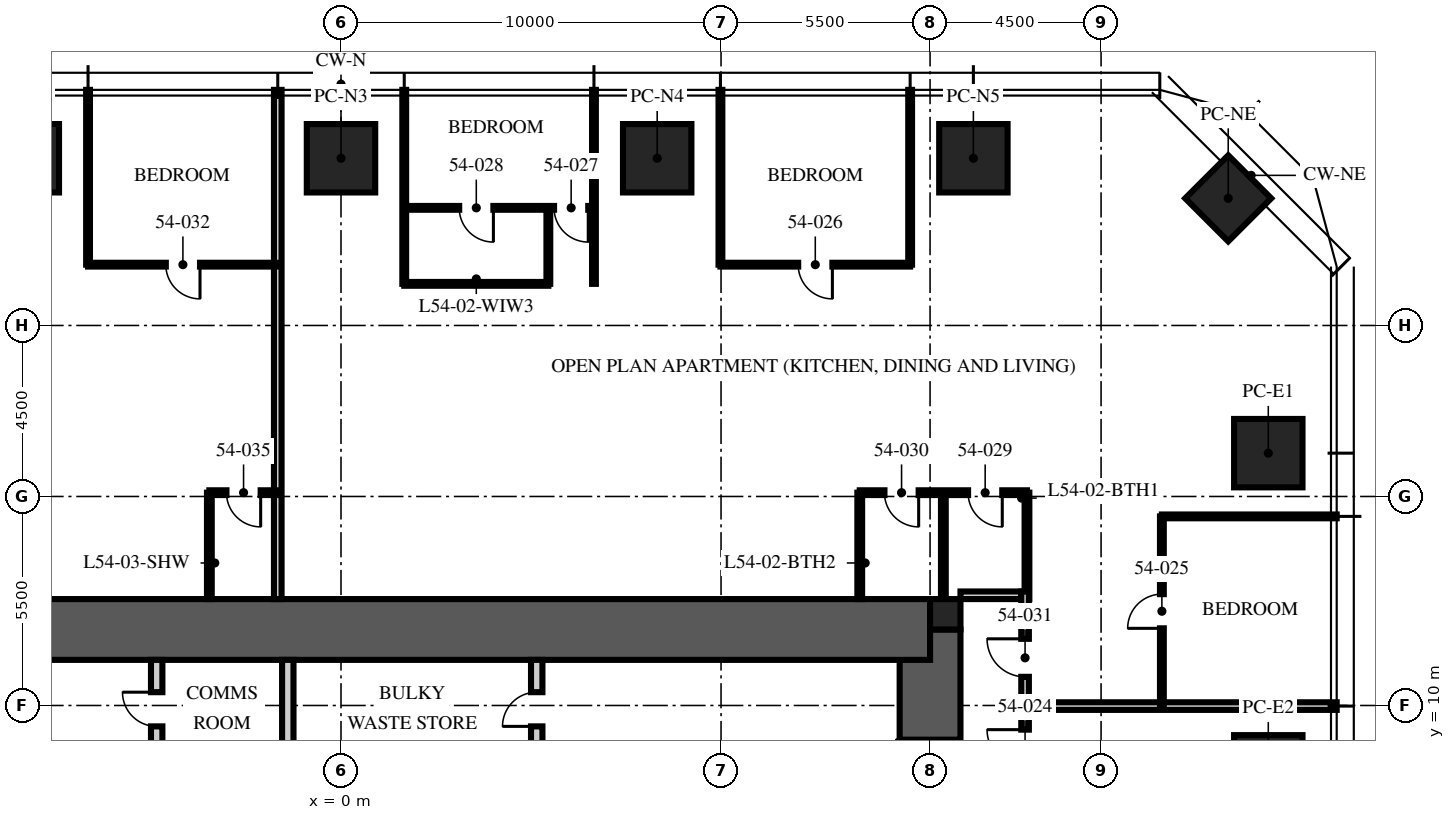
"""IFC4 building model, lengths in metres.
Left out: names, types, materials, properties, quantities, classifications, styles, units other than length and angle.
Written with IfcOpenShell. Run it as: python <this file> out.ifc"""

import sys

from ifc_helpers import new_model, si_unit, direction, frame, frame_2d, origin, origin_2d, place, context, subcontext, project, spatial, rectangle, extrude, element, fill, save


model = new_model("IFC4")
c1 = context("Model", 3, precision=1e-05, world=origin(), true_north=direction((0.0, 1.0)))
c2 = subcontext(c1, "Body", "Model", "MODEL_VIEW")
j1 = project(units=[si_unit("LENGTHUNIT", "METRE"), si_unit("PLANEANGLEUNIT", "RADIAN")], contexts=[c1])
p1 = place(None, origin())
s1 = spatial("IfcSite", under=j1, at=p1, CompositionType="ELEMENT")
p2 = place(p1, origin())
s2 = spatial("IfcBuilding", under=s1, at=p2, CompositionType="ELEMENT")
p3 = place(p2, frame((0.0, 0.0, 218.25)))
s3 = spatial("IfcBuildingStorey", under=s2, at=p3, CompositionType="ELEMENT", Elevation=218.25)
p4 = place(p3, frame((15.5, -12.0, -0.25), z_axis=(0.0, 0.0, 1.0), x_axis=(0.0, 1.0, 0.0)))
e1 = element("IfcWall", 1, at=p4, inside=s3, PredefinedType="SHEAR", context=c2, shape_type="SweptSolid", body=[
    extrude(rectangle(XDim=24.0, YDim=1.6, at=frame_2d((12.0, 0.0))), origin(), (0.0, 0.0, 1.0), 3.75),
])
p5 = place(p4, frame((3.2, 0.0, 0.25)))
e2 = element("IfcOpeningElement", 2, at=p5, cuts=e1, PredefinedType="OPENING", context=c2, shape_type="SweptSolid", body=[
    extrude(rectangle(XDim=1.2, YDim=2.1, at=frame_2d((0.6, 1.05))), frame((0.0, 0.81, 0.0), z_axis=(0.0, -1.0, 0.0), x_axis=(1.0, 0.0, 0.0)), (0.0, 0.0, 1.0), 1.62),
])
p6 = place(p4, frame((19.3, 0.0, 0.25)))
e3 = element("IfcOpeningElement", 3, at=p6, cuts=e1, PredefinedType="OPENING", context=c2, shape_type="SweptSolid", body=[
    extrude(rectangle(XDim=1.8, YDim=2.1, at=frame_2d((0.9, 1.05))), frame((0.0, 0.81, 0.0), z_axis=(0.0, -1.0, 0.0), x_axis=(1.0, 0.0, 0.0)), (0.0, 0.0, 1.0), 1.62),
])
p7 = place(p3, frame((-15.5, 12.0, -0.25), z_axis=(0.0, 0.0, 1.0), x_axis=(1.0, 0.0, 0.0)))
e4 = element("IfcWall", 4, at=p7, inside=s3, PredefinedType="SHEAR", context=c2, shape_type="SweptSolid", body=[
    extrude(rectangle(XDim=31.0, YDim=1.6, at=frame_2d((15.5, 0.0))), origin(), (0.0, 0.0, 1.0), 3.75),
])
p8 = place(p3, frame((15.9, 12.4, -0.25), z_axis=(0.0, 0.0, 1.0), x_axis=(1.0, 0.0, 0.0)))
e5 = element("IfcColumn", 5, at=p8, inside=s3, PredefinedType="COLUMN", context=c2, shape_type="SweptSolid", body=[
    extrude(rectangle(XDim=0.8, YDim=0.8, at=origin_2d()), origin(), (0.0, 0.0, 1.0), 3.75),
])
for number, where, z_axis, x_axis in (
    (6, (-8.32, 24.4, 0.0), (0.0, 0.0, 1.0), (1.0, 0.0, 0.0)),
    (7, (0.0, 24.4, 0.0), (0.0, 0.0, 1.0), (1.0, 0.0, 0.0)),
    (8, (8.32, 24.4, 0.0), (0.0, 0.0, 1.0), (1.0, 0.0, 0.0)),
    (9, (16.64, 24.4, 0.0), (0.0, 0.0, 1.0), (1.0, 0.0, 0.0)),
    (10, (24.4, 16.64, 0.0), (0.0, 0.0, 1.0), (0.0, 1.0, 0.0)),
    (11, (24.4, 8.32, 0.0), (0.0, 0.0, 1.0), (0.0, 1.0, 0.0)),
):
    element("IfcColumn", number, at=place(p3, frame(where, z_axis=z_axis, x_axis=x_axis)), inside=s3, PredefinedType="COLUMN", context=c2, shape_type="SweptSolid", body=[
        extrude(rectangle(XDim=1.8, YDim=1.8, at=origin_2d()), origin(), (0.0, 0.0, 1.0), 3.75),
    ])
p9 = place(p3, frame((23.346, 23.346, 0.0), z_axis=(0.0, 0.0, 1.0), x_axis=(0.707106781187, -0.707106781187, 0.0)))
e12 = element("IfcColumn", 12, at=p9, inside=s3, PredefinedType="COLUMN", context=c2, shape_type="SweptSolid", body=[
    extrude(rectangle(XDim=1.6, YDim=1.6, at=origin_2d()), origin(), (0.0, 0.0, 1.0), 3.75),
])
p10 = place(p3, frame((-4.85, 5.3, 0.0), z_axis=(0.0, 0.0, 1.0), x_axis=(0.0, 1.0, 0.0)))
e13 = element("IfcWall", 13, at=p10, inside=s3, PredefinedType="PARTITIONING", context=c2, shape_type="SweptSolid", body=[
    extrude(rectangle(XDim=5.9, YDim=0.3, at=frame_2d((2.95, 0.0))), origin(), (0.0, 0.0, 1.0), 3.5),
])
p11 = place(p10, frame((4.15, 0.0, 0.0)))
e14 = element("IfcOpeningElement", 14, at=p11, cuts=e13, PredefinedType="OPENING", context=c2, shape_type="SweptSolid", body=[
    extrude(rectangle(XDim=0.9, YDim=2.1, at=frame_2d((0.45, 1.05))), frame((0.0, 0.16, 0.0), z_axis=(0.0, -1.0, 0.0), x_axis=(1.0, 0.0, 0.0)), (0.0, 0.0, 1.0), 0.32),
])
p12 = place(p3, frame((5.15, 5.3, 0.0), z_axis=(0.0, 0.0, 1.0), x_axis=(0.0, 1.0, 0.0)))
e15 = element("IfcWall", 15, at=p12, inside=s3, PredefinedType="PARTITIONING", context=c2, shape_type="SweptSolid", body=[
    extrude(rectangle(XDim=5.9, YDim=0.3, at=frame_2d((2.95, 0.0))), origin(), (0.0, 0.0, 1.0), 3.5),
])
p13 = place(p12, frame((4.15, 0.0, 0.0)))
e16 = element("IfcOpeningElement", 16, at=p13, cuts=e15, PredefinedType="OPENING", context=c2, shape_type="SweptSolid", body=[
    extrude(rectangle(XDim=0.9, YDim=2.1, at=frame_2d((0.45, 1.05))), frame((0.0, 0.16, 0.0), z_axis=(0.0, -1.0, 0.0), x_axis=(1.0, 0.0, 0.0)), (0.0, 0.0, 1.0), 0.32),
])
p14 = place(p3, frame((-1.4, 8.5, 0.0), z_axis=(0.0, 0.0, 1.0), x_axis=(0.0, 1.0, 0.0)))
e17 = element("IfcWall", 17, at=p14, inside=s3, PredefinedType="PARTITIONING", context=c2, shape_type="SweptSolid", body=[
    extrude(rectangle(XDim=2.7, YDim=0.3, at=frame_2d((1.35, 0.0))), origin(), (0.0, 0.0, 1.0), 3.5),
])
p15 = place(p3, frame((16.3, 12.9, 0.0), z_axis=(0.0, 0.0, 1.0), x_axis=(1.0, 0.0, 0.0)))
e18 = element("IfcWall", 18, at=p15, inside=s3, PredefinedType="PARTITIONING", context=c2, shape_type="SweptSolid", body=[
    extrude(rectangle(XDim=1.6, YDim=0.2, at=frame_2d((0.8, 0.0))), origin(), (0.0, 0.0, 1.0), 2.3),
])
p16 = place(p3, frame((18.1, 9.984, 0.0), z_axis=(0.0, 0.0, 1.0), x_axis=(1.0, 0.0, 0.0)))
e19 = element("IfcWall", 19, at=p16, inside=s3, PredefinedType="PARTITIONING", context=c2, shape_type="SweptSolid", body=[
    extrude(rectangle(XDim=8.1, YDim=0.2, at=frame_2d((4.05, 0.0))), origin(), (0.0, 0.0, 1.0), 2.91),
])
for number, where, z_axis, x_axis in (
    (20, (21.6, 14.976, 0.0), (0.0, 0.0, 1.0), (1.0, 0.0, 0.0)),
    (21, (14.976, 21.6, 0.0), (0.0, 0.0, 1.0), (0.0, 1.0, 0.0)),
    (22, (9.984, 21.6, 0.0), (0.0, 0.0, 1.0), (0.0, 1.0, 0.0)),
):
    element("IfcWall", number, at=place(p3, frame(where, z_axis=z_axis, x_axis=x_axis)), inside=s3, PredefinedType="PARTITIONING", context=c2, shape_type="SweptSolid", body=[
        extrude(rectangle(XDim=4.6, YDim=0.1, at=frame_2d((2.3, 0.0))), origin(), (0.0, 0.0, 1.0), 2.91),
    ])
for number, where, z_axis, x_axis in (
    (23, (6.656, 21.095, 0.0), (0.0, 0.0, 1.0), (0.0, 1.0, 0.0)),
    (24, (1.664, 21.095, 0.0), (0.0, 0.0, 1.0), (0.0, 1.0, 0.0)),
):
    element("IfcWall", number, at=place(p3, frame(where, z_axis=z_axis, x_axis=x_axis)), inside=s3, PredefinedType="PARTITIONING", context=c2, shape_type="SweptSolid", body=[
        extrude(rectangle(XDim=5.105, YDim=0.1, at=frame_2d((2.552, 0.0))), origin(), (0.0, 0.0, 1.0), 2.91),
    ])
p17 = place(p3, frame((-1.664, 12.8, 0.0), z_axis=(0.0, 0.0, 1.0), x_axis=(0.0, 1.0, 0.0)))
e25 = element("IfcWall", 25, at=p17, inside=s3, PredefinedType="PARTITIONING", context=c2, shape_type="SweptSolid", body=[
    extrude(rectangle(XDim=13.4, YDim=0.2, at=frame_2d((6.7, 0.0))), origin(), (0.0, 0.0, 1.0), 2.91),
])
p18 = place(p3, frame((-6.656, 21.6, 0.0), z_axis=(0.0, 0.0, 1.0), x_axis=(0.0, 1.0, 0.0)))
e26 = element("IfcWall", 26, at=p18, inside=s3, PredefinedType="PARTITIONING", context=c2, shape_type="SweptSolid", body=[
    extrude(rectangle(XDim=4.6, YDim=0.1, at=frame_2d((2.3, 0.0))), origin(), (0.0, 0.0, 1.0), 2.91),
])
p19 = place(p3, frame((21.6, 9.984, 0.0), z_axis=(0.0, 0.0, 1.0), x_axis=(0.0, 1.0, 0.0)))
e27 = element("IfcWall", 27, at=p19, inside=s3, PredefinedType="PARTITIONING", context=c2, shape_type="SweptSolid", body=[
    extrude(rectangle(XDim=4.992, YDim=0.1, at=frame_2d((2.496, 0.0))), origin(), (0.0, 0.0, 1.0), 2.81),
])
p20 = place(p19, frame((2.046, 0.0, 0.0)))
e28 = element("IfcOpeningElement", 28, at=p20, cuts=e27, PredefinedType="OPENING", context=c2, shape_type="SweptSolid", body=[
    extrude(rectangle(XDim=0.9, YDim=2.1, at=frame_2d((0.45, 1.05))), frame((0.0, 0.06, 0.0), z_axis=(0.0, -1.0, 0.0), x_axis=(1.0, 0.0, 0.0)), (0.0, 0.0, 1.0), 0.12),
])
p21 = place(p3, frame((14.976, 21.6, 0.0), z_axis=(0.0, 0.0, 1.0), x_axis=(-1.0, 0.0, 0.0)))
e29 = element("IfcWall", 29, at=p21, inside=s3, PredefinedType="PARTITIONING", context=c2, shape_type="SweptSolid", body=[
    extrude(rectangle(XDim=4.992, YDim=0.1, at=frame_2d((2.496, 0.0))), origin(), (0.0, 0.0, 1.0), 2.81),
])
p22 = place(p21, frame((2.046, 0.0, 0.0)))
e30 = element("IfcOpeningElement", 30, at=p22, cuts=e29, PredefinedType="OPENING", context=c2, shape_type="SweptSolid", body=[
    extrude(rectangle(XDim=0.9, YDim=2.1, at=frame_2d((0.45, 1.05))), frame((0.0, 0.06, 0.0), z_axis=(0.0, -1.0, 0.0), x_axis=(1.0, 0.0, 0.0)), (0.0, 0.0, 1.0), 0.12),
])
p23 = place(p3, frame((6.656, 23.095, 0.0), z_axis=(0.0, 0.0, 1.0), x_axis=(-1.0, 0.0, 0.0)))
e31 = element("IfcWall", 31, at=p23, inside=s3, PredefinedType="PARTITIONING", context=c2, shape_type="SweptSolid", body=[
    extrude(rectangle(XDim=4.992, YDim=0.1, at=frame_2d((2.496, 0.0))), origin(), (0.0, 0.0, 1.0), 2.81),
])
p24 = place(p23, frame((0.15, 0.0, 0.0)))
e32 = element("IfcOpeningElement", 32, at=p24, cuts=e31, PredefinedType="OPENING", context=c2, shape_type="SweptSolid", body=[
    extrude(rectangle(XDim=0.9, YDim=2.1, at=frame_2d((0.45, 1.05))), frame((0.0, 0.06, 0.0), z_axis=(0.0, -1.0, 0.0), x_axis=(1.0, 0.0, 0.0)), (0.0, 0.0, 1.0), 0.12),
])
p25 = place(p23, frame((2.646, 0.0, 0.0)))
e33 = element("IfcOpeningElement", 33, at=p25, cuts=e31, PredefinedType="OPENING", context=c2, shape_type="SweptSolid", body=[
    extrude(rectangle(XDim=0.9, YDim=2.1, at=frame_2d((0.45, 1.05))), frame((0.0, 0.06, 0.0), z_axis=(0.0, -1.0, 0.0), x_axis=(1.0, 0.0, 0.0)), (0.0, 0.0, 1.0), 0.12),
])
p26 = place(p3, frame((5.456, 21.095, 0.0), z_axis=(0.0, 0.0, 1.0), x_axis=(0.0, 1.0, 0.0)))
e34 = element("IfcWall", 34, at=p26, inside=s3, PredefinedType="PARTITIONING", context=c2, shape_type="SweptSolid", body=[
    extrude(rectangle(XDim=2.0, YDim=0.1, at=frame_2d((1.0, 0.0))), origin(), (0.0, 0.0, 1.0), 3.5),
])
p27 = place(p3, frame((5.456, 21.095, 0.0), z_axis=(0.0, 0.0, 1.0), x_axis=(-1.0, 0.0, 0.0)))
e35 = element("IfcWall", 35, at=p27, inside=s3, PredefinedType="PARTITIONING", context=c2, shape_type="SweptSolid", body=[
    extrude(rectangle(XDim=3.792, YDim=0.1, at=frame_2d((1.896, 0.0))), origin(), (0.0, 0.0, 1.0), 2.81),
])
p28 = place(p3, frame((18.05, 15.6, 0.0), z_axis=(0.0, 0.0, 1.0), x_axis=(-1.0, 0.0, 0.0)))
e36 = element("IfcWall", 36, at=p28, inside=s3, PredefinedType="PARTITIONING", context=c2, shape_type="SweptSolid", body=[
    extrude(rectangle(XDim=4.4, YDim=0.125, at=frame_2d((2.2, 0.0))), origin(), (0.0, 0.0, 1.0), 2.3),
])
p29 = place(p28, frame((0.65, 0.0, 0.0)))
e37 = element("IfcOpeningElement", 37, at=p29, cuts=e36, PredefinedType="OPENING", context=c2, shape_type="SweptSolid", body=[
    extrude(rectangle(XDim=0.9, YDim=2.1, at=frame_2d((0.45, 1.05))), frame((0.0, 0.073, 0.0), z_axis=(0.0, -1.0, 0.0), x_axis=(1.0, 0.0, 0.0)), (0.0, 0.0, 1.0), 0.145),
])
p30 = place(p28, frame((2.85, 0.0, 0.0)))
e38 = element("IfcOpeningElement", 38, at=p30, cuts=e36, PredefinedType="OPENING", context=c2, shape_type="SweptSolid", body=[
    extrude(rectangle(XDim=0.9, YDim=2.1, at=frame_2d((0.45, 1.05))), frame((0.0, 0.073, 0.0), z_axis=(0.0, -1.0, 0.0), x_axis=(1.0, 0.0, 0.0)), (0.0, 0.0, 1.0), 0.145),
])
for number, where, z_axis, x_axis in (
    (39, (18.05, 12.8, 0.0), (0.0, 0.0, 1.0), (0.0, 1.0, 0.0)),
    (40, (15.85, 12.8, 0.0), (0.0, 0.0, 1.0), (0.0, 1.0, 0.0)),
):
    element("IfcWall", number, at=place(p3, frame(where, z_axis=z_axis, x_axis=x_axis)), inside=s3, PredefinedType="PARTITIONING", context=c2, shape_type="SweptSolid", body=[
        extrude(rectangle(XDim=2.8, YDim=0.125, at=frame_2d((1.4, 0.0))), origin(), (0.0, 0.0, 1.0), 2.3),
    ])
p31 = place(p3, frame((13.65, 12.8, 0.0), z_axis=(0.0, 0.0, 1.0), x_axis=(0.0, 1.0, 0.0)))
e41 = element("IfcWall", 41, at=p31, inside=s3, PredefinedType="PARTITIONING", context=c2, shape_type="SweptSolid", body=[
    extrude(rectangle(XDim=2.8, YDim=0.125, at=frame_2d((1.4, 0.0))), origin(), (0.0, 0.0, 1.0), 3.5),
])
p32 = place(p3, frame((-1.664, 21.6, 0.0), z_axis=(0.0, 0.0, 1.0), x_axis=(-1.0, 0.0, 0.0)))
e42 = element("IfcWall", 42, at=p32, inside=s3, PredefinedType="PARTITIONING", context=c2, shape_type="SweptSolid", body=[
    extrude(rectangle(XDim=4.992, YDim=0.1, at=frame_2d((2.496, 0.0))), origin(), (0.0, 0.0, 1.0), 2.81),
])
p33 = place(p32, frame((2.046, 0.0, 0.0)))
e43 = element("IfcOpeningElement", 43, at=p33, cuts=e42, PredefinedType="OPENING", context=c2, shape_type="SweptSolid", body=[
    extrude(rectangle(XDim=0.9, YDim=2.1, at=frame_2d((0.45, 1.05))), frame((0.0, 0.06, 0.0), z_axis=(0.0, -1.0, 0.0), x_axis=(1.0, 0.0, 0.0)), (0.0, 0.0, 1.0), 0.12),
])
p34 = place(p3, frame((-1.664, 15.6, 0.0), z_axis=(0.0, 0.0, 1.0), x_axis=(-1.0, 0.0, 0.0)))
e44 = element("IfcWall", 44, at=p34, inside=s3, PredefinedType="PARTITIONING", context=c2, shape_type="SweptSolid", body=[
    extrude(rectangle(XDim=1.8, YDim=0.125, at=frame_2d((0.9, 0.0))), origin(), (0.0, 0.0, 1.0), 3.5),
])
p35 = place(p34, frame((0.45, 0.0, 0.0)))
e45 = element("IfcOpeningElement", 45, at=p35, cuts=e44, PredefinedType="OPENING", context=c2, shape_type="SweptSolid", body=[
    extrude(rectangle(XDim=0.9, YDim=2.1, at=frame_2d((0.45, 1.05))), frame((0.0, 0.073, 0.0), z_axis=(0.0, -1.0, 0.0), x_axis=(1.0, 0.0, 0.0)), (0.0, 0.0, 1.0), 0.145),
])
p36 = place(p3, frame((-3.464, 12.8, 0.0), z_axis=(0.0, 0.0, 1.0), x_axis=(0.0, 1.0, 0.0)))
e46 = element("IfcWall", 46, at=p36, inside=s3, PredefinedType="PARTITIONING", context=c2, shape_type="SweptSolid", body=[
    extrude(rectangle(XDim=2.8, YDim=0.125, at=frame_2d((1.4, 0.0))), origin(), (0.0, 0.0, 1.0), 3.5),
])
p37 = place(p3, frame((18.0, -13.0, 0.0), z_axis=(0.0, 0.0, 1.0), x_axis=(0.0, 1.0, 0.0)))
e47 = element("IfcWall", 47, at=p37, inside=s3, PredefinedType="PARTITIONING", context=c2, shape_type="SweptSolid", body=[
    extrude(rectangle(XDim=26.0, YDim=0.2, at=frame_2d((13.0, 0.0))), origin(), (0.0, 0.0, 1.0), 2.6),
])
p38 = place(p37, frame((21.364, 0.0, 0.0)))
e48 = element("IfcOpeningElement", 48, at=p38, cuts=e47, PredefinedType="OPENING", context=c2, shape_type="SweptSolid", body=[
    extrude(rectangle(XDim=1.0, YDim=2.2, at=frame_2d((0.5, 1.1))), frame((0.0, 0.11, 0.0), z_axis=(0.0, -1.0, 0.0), x_axis=(1.0, 0.0, 0.0)), (0.0, 0.0, 1.0), 0.22),
])
p39 = place(p37, frame((23.754, 0.0, 0.0)))
e49 = element("IfcOpeningElement", 49, at=p39, cuts=e47, PredefinedType="OPENING", context=c2, shape_type="SweptSolid", body=[
    extrude(rectangle(XDim=1.0, YDim=2.2, at=frame_2d((0.5, 1.1))), frame((0.0, 0.11, 0.0), z_axis=(0.0, -1.0, 0.0), x_axis=(1.0, 0.0, 0.0)), (0.0, 0.0, 1.0), 0.22),
])
p40 = place(p37, frame((4.6, 0.0, 0.0)))
e50 = element("IfcOpeningElement", 50, at=p40, cuts=e47, PredefinedType="OPENING", context=c2, shape_type="SweptSolid", body=[
    extrude(rectangle(XDim=1.0, YDim=2.2, at=frame_2d((0.5, 1.1))), frame((0.0, 0.11, 0.0), z_axis=(0.0, -1.0, 0.0), x_axis=(1.0, 0.0, 0.0)), (0.0, 0.0, 1.0), 0.22),
])
p41 = place(p6, origin())
e51 = element("IfcDoor", 51, at=p41, inside=s3, OperationType="DOUBLE_DOOR_SINGLE_SWING", PredefinedType="DOOR", context=c2, shape_type="SweptSolid", body=[
    extrude(rectangle(XDim=1.8, YDim=2.1, at=frame_2d((0.9, 1.05))), frame((0.0, 0.025, 0.0), z_axis=(0.0, -1.0, 0.0), x_axis=(1.0, 0.0, 0.0)), (0.0, 0.0, 1.0), 0.05),
])
fill(e3, e51)
p42 = place(p11, origin())
e52 = element("IfcDoor", 52, at=p42, inside=s3, OperationType="SINGLE_SWING_RIGHT", PredefinedType="DOOR", context=c2, shape_type="SweptSolid", body=[
    extrude(rectangle(XDim=0.9, YDim=2.1, at=frame_2d((0.45, 1.05))), frame((0.0, 0.025, 0.0), z_axis=(0.0, -1.0, 0.0), x_axis=(1.0, 0.0, 0.0)), (0.0, 0.0, 1.0), 0.05),
])
fill(e14, e52)
p43 = place(p13, origin())
e53 = element("IfcDoor", 53, at=p43, inside=s3, OperationType="SINGLE_SWING_LEFT", PredefinedType="DOOR", context=c2, shape_type="SweptSolid", body=[
    extrude(rectangle(XDim=0.9, YDim=2.1, at=frame_2d((0.45, 1.05))), frame((0.0, 0.025, 0.0), z_axis=(0.0, -1.0, 0.0), x_axis=(1.0, 0.0, 0.0)), (0.0, 0.0, 1.0), 0.05),
])
fill(e16, e53)
p44 = place(p38, origin())
e54 = element("IfcDoor", 54, at=p44, inside=s3, OperationType="SINGLE_SWING_RIGHT", PredefinedType="DOOR", context=c2, shape_type="SweptSolid", body=[
    extrude(rectangle(XDim=1.0, YDim=2.2, at=frame_2d((0.5, 1.1))), frame((0.0, 0.025, 0.0), z_axis=(0.0, -1.0, 0.0), x_axis=(1.0, 0.0, 0.0)), (0.0, 0.0, 1.0), 0.05),
])
fill(e48, e54)
p45 = place(p20, origin())
e55 = element("IfcDoor", 55, at=p45, inside=s3, OperationType="SINGLE_SWING_LEFT", PredefinedType="DOOR", context=c2, shape_type="SweptSolid", body=[
    extrude(rectangle(XDim=0.9, YDim=2.1, at=frame_2d((0.45, 1.05))), frame((0.0, 0.025, 0.0), z_axis=(0.0, -1.0, 0.0), x_axis=(1.0, 0.0, 0.0)), (0.0, 0.0, 1.0), 0.05),
])
fill(e28, e55)
p46 = place(p22, origin())
e56 = element("IfcDoor", 56, at=p46, inside=s3, OperationType="SINGLE_SWING_LEFT", PredefinedType="DOOR", context=c2, shape_type="SweptSolid", body=[
    extrude(rectangle(XDim=0.9, YDim=2.1, at=frame_2d((0.45, 1.05))), frame((0.0, 0.025, 0.0), z_axis=(0.0, -1.0, 0.0), x_axis=(1.0, 0.0, 0.0)), (0.0, 0.0, 1.0), 0.05),
])
fill(e30, e56)
p47 = place(p24, origin())
e57 = element("IfcDoor", 57, at=p47, inside=s3, OperationType="SINGLE_SWING_LEFT", PredefinedType="DOOR", context=c2, shape_type="SweptSolid", body=[
    extrude(rectangle(XDim=0.9, YDim=2.1, at=frame_2d((0.45, 1.05))), frame((0.0, 0.025, 0.0), z_axis=(0.0, -1.0, 0.0), x_axis=(1.0, 0.0, 0.0)), (0.0, 0.0, 1.0), 0.05),
])
fill(e32, e57)
p48 = place(p25, origin())
e58 = element("IfcDoor", 58, at=p48, inside=s3, OperationType="SINGLE_SWING_LEFT", PredefinedType="DOOR", context=c2, shape_type="SweptSolid", body=[
    extrude(rectangle(XDim=0.9, YDim=2.1, at=frame_2d((0.45, 1.05))), frame((0.0, 0.025, 0.0), z_axis=(0.0, -1.0, 0.0), x_axis=(1.0, 0.0, 0.0)), (0.0, 0.0, 1.0), 0.05),
])
fill(e33, e58)
p49 = place(p29, origin())
e59 = element("IfcDoor", 59, at=p49, inside=s3, OperationType="SINGLE_SWING_LEFT", PredefinedType="DOOR", context=c2, shape_type="SweptSolid", body=[
    extrude(rectangle(XDim=0.9, YDim=2.1, at=frame_2d((0.45, 1.05))), frame((0.0, 0.025, 0.0), z_axis=(0.0, -1.0, 0.0), x_axis=(1.0, 0.0, 0.0)), (0.0, 0.0, 1.0), 0.05),
])
fill(e37, e59)
p50 = place(p30, origin())
e60 = element("IfcDoor", 60, at=p50, inside=s3, OperationType="SINGLE_SWING_LEFT", PredefinedType="DOOR", context=c2, shape_type="SweptSolid", body=[
    extrude(rectangle(XDim=0.9, YDim=2.1, at=frame_2d((0.45, 1.05))), frame((0.0, 0.025, 0.0), z_axis=(0.0, -1.0, 0.0), x_axis=(1.0, 0.0, 0.0)), (0.0, 0.0, 1.0), 0.05),
])
fill(e38, e60)
p51 = place(p39, origin())
e61 = element("IfcDoor", 61, at=p51, inside=s3, OperationType="SINGLE_SWING_RIGHT", PredefinedType="DOOR", context=c2, shape_type="SweptSolid", body=[
    extrude(rectangle(XDim=1.0, YDim=2.2, at=frame_2d((0.5, 1.1))), frame((0.0, 0.025, 0.0), z_axis=(0.0, -1.0, 0.0), x_axis=(1.0, 0.0, 0.0)), (0.0, 0.0, 1.0), 0.05),
])
fill(e49, e61)
p52 = place(p33, origin())
e62 = element("IfcDoor", 62, at=p52, inside=s3, OperationType="SINGLE_SWING_LEFT", PredefinedType="DOOR", context=c2, shape_type="SweptSolid", body=[
    extrude(rectangle(XDim=0.9, YDim=2.1, at=frame_2d((0.45, 1.05))), frame((0.0, 0.025, 0.0), z_axis=(0.0, -1.0, 0.0), x_axis=(1.0, 0.0, 0.0)), (0.0, 0.0, 1.0), 0.05),
])
fill(e43, e62)
p53 = place(p35, origin())
e63 = element("IfcDoor", 63, at=p53, inside=s3, OperationType="SINGLE_SWING_LEFT", PredefinedType="DOOR", context=c2, shape_type="SweptSolid", body=[
    extrude(rectangle(XDim=0.9, YDim=2.1, at=frame_2d((0.45, 1.05))), frame((0.0, 0.025, 0.0), z_axis=(0.0, -1.0, 0.0), x_axis=(1.0, 0.0, 0.0)), (0.0, 0.0, 1.0), 0.05),
])
fill(e45, e63)
save(model, sys.argv[1])
